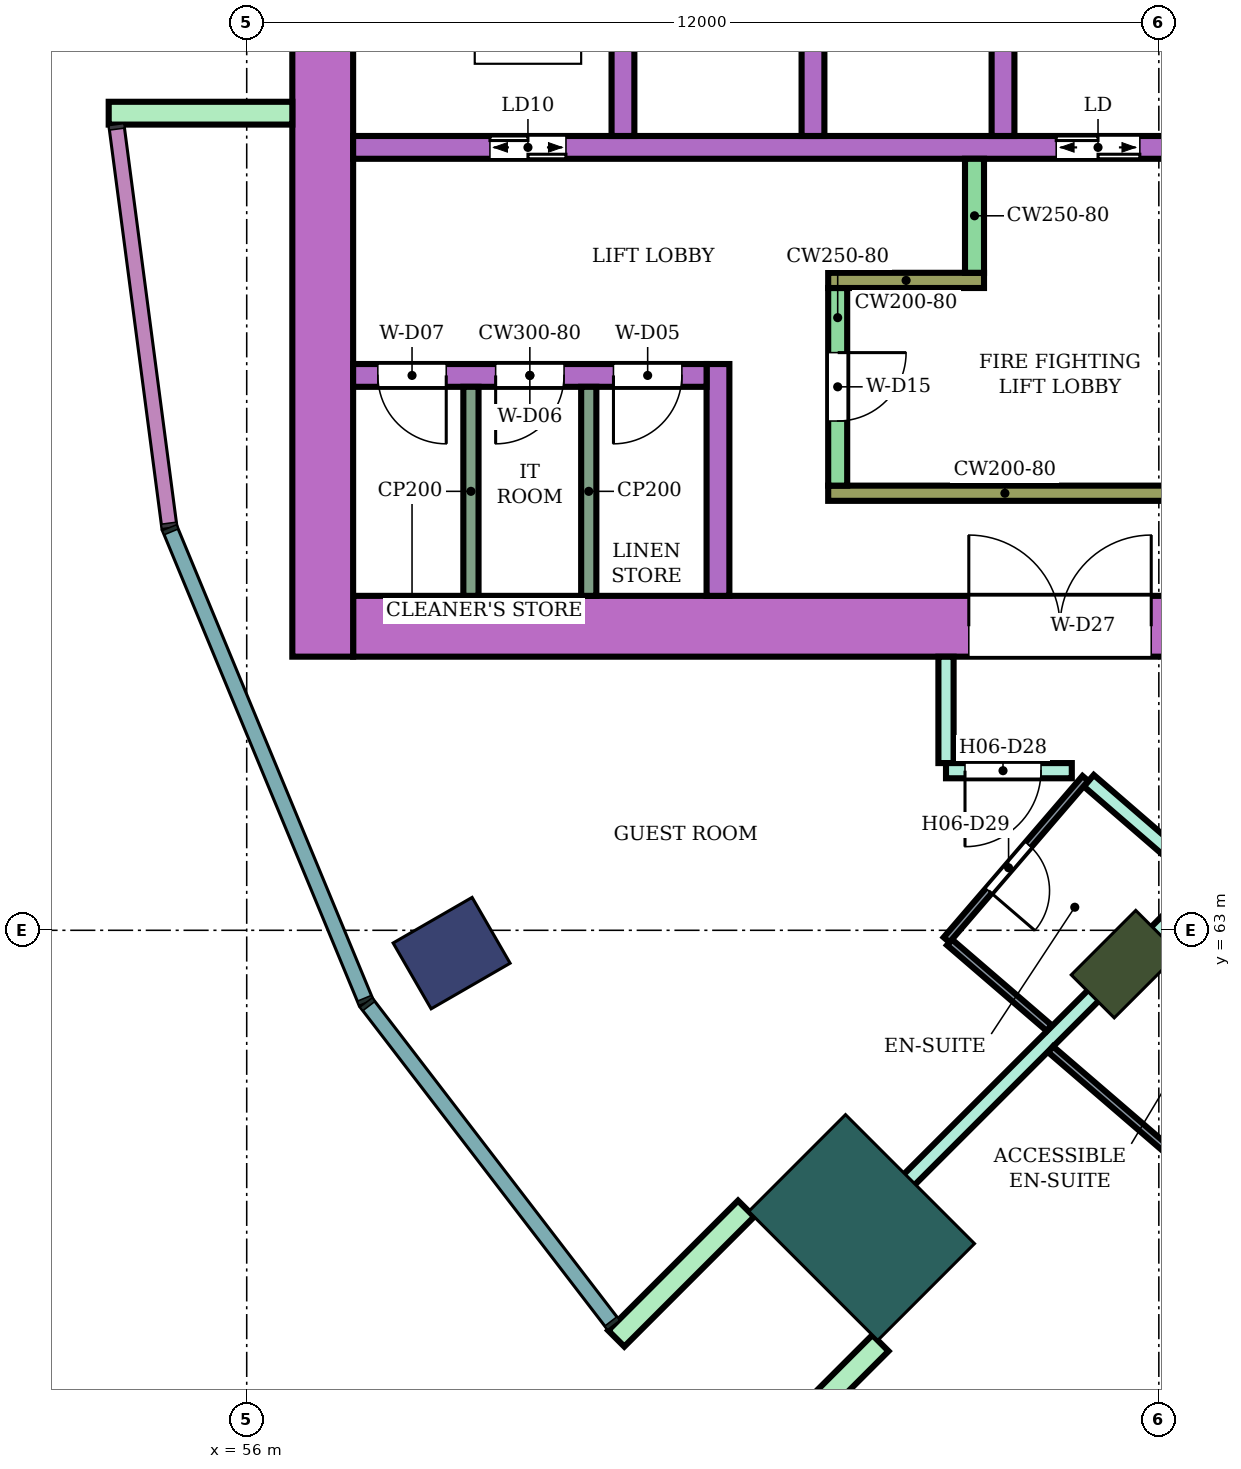
"""IFC4 building model, lengths in metres.
Left out: names, types, materials, properties, quantities, classifications, styles, units other than length and angle.
Written with IfcOpenShell. Run it as: python <this file> out.ifc"""

import sys

from ifc_helpers import new_model, si_unit, direction, frame, frame_2d, origin, origin_2d, place, context, subcontext, project, spatial, rectangle, extrude, element, fill, save


model = new_model("IFC4")
c1 = context("Model", 3, precision=1e-05, world=origin(), true_north=direction((0.0, 1.0)))
c2 = subcontext(c1, "Body", "Model", "MODEL_VIEW")
j1 = project(units=[si_unit("LENGTHUNIT", "METRE"), si_unit("PLANEANGLEUNIT", "RADIAN")], contexts=[c1])
p1 = place(None, origin())
s1 = spatial("IfcSite", under=j1, at=p1, CompositionType="ELEMENT")
p2 = place(p1, origin())
s2 = spatial("IfcBuilding", under=s1, at=p2, CompositionType="ELEMENT")
p3 = place(p2, frame((0.0, 0.0, 101.4)))
s3 = spatial("IfcBuildingStorey", under=s2, at=p3, CompositionType="ELEMENT", Elevation=101.4)
p4 = place(p3, frame((58.696, 62.7, 0.0), z_axis=(0.0, 0.0, 1.0), x_axis=(-0.866025403784, -0.5, 0.0)))
e1 = element("IfcColumn", 1, at=p4, inside=s3, PredefinedType="COLUMN", context=c2, shape_type="SweptSolid", body=[
    extrude(rectangle(XDim=1.2, YDim=1.0, at=origin_2d()), origin(), (0.0, 0.0, 1.0), 3.8),
])
p5 = place(p3, frame((67.555, 62.555, 0.0), z_axis=(0.0, 0.0, 1.0), x_axis=(-0.707106781187, -0.707106781187, 0.0)))
e2 = element("IfcColumn", 2, at=p5, inside=s3, PredefinedType="COLUMN", context=c2, shape_type="SweptSolid", body=[
    extrude(rectangle(XDim=1.2, YDim=0.8, at=origin_2d()), origin(), (0.0, 0.0, 1.0), 3.8),
])
p6 = place(p3, frame((64.09, 59.09, 0.0), z_axis=(0.0, 0.0, 1.0), x_axis=(-0.707106781187, -0.707106781187, 0.0)))
e3 = element("IfcColumn", 3, at=p6, inside=s3, PredefinedType="COLUMN", context=c2, shape_type="SweptSolid", body=[
    extrude(rectangle(XDim=1.8, YDim=2.4, at=origin_2d()), origin(), (0.0, 0.0, 1.0), 3.8),
])
p7 = place(p3, frame((72.1, 67.0, 0.0), z_axis=(0.0, 0.0, 1.0), x_axis=(-1.0, 0.0, 0.0)))
e4 = element("IfcWall", 4, at=p7, inside=s3, PredefinedType="SHEAR", context=c2, shape_type="SweptSolid", body=[
    extrude(rectangle(XDim=14.7, YDim=0.8, at=frame_2d((7.35, 0.0))), origin(), (0.0, 0.0, 1.0), 3.48),
])
p8 = place(p7, frame((4.2, 0.0, 0.0)))
e5 = element("IfcOpeningElement", 5, at=p8, cuts=e4, PredefinedType="OPENING", context=c2, shape_type="SweptSolid", body=[
    extrude(rectangle(XDim=2.4, YDim=2.4, at=frame_2d((1.2, 1.2))), frame((0.0, 0.41, 0.0), z_axis=(0.0, -1.0, 0.0), x_axis=(1.0, 0.0, 0.0)), (0.0, 0.0, 1.0), 0.82),
])
p9 = place(p3, frame((57.0, 83.4, 0.0), z_axis=(0.0, 0.0, 1.0), x_axis=(0.0, -1.0, 0.0)))
e6 = element("IfcWall", 6, at=p9, inside=s3, PredefinedType="SHEAR", context=c2, shape_type="SweptSolid", body=[
    extrude(rectangle(XDim=16.8, YDim=0.8, at=frame_2d((8.4, 0.0))), origin(), (0.0, 0.0, 1.0), 3.48),
])
p10 = place(p3, frame((68.3, 73.3, 0.0), z_axis=(0.0, 0.0, 1.0), x_axis=(-1.0, 0.0, 0.0)))
e7 = element("IfcWall", 7, at=p10, inside=s3, PredefinedType="SHEAR", context=c2, shape_type="SweptSolid", body=[
    extrude(rectangle(XDim=10.9, YDim=0.3, at=frame_2d((5.45, 0.0))), origin(), (0.0, 0.0, 1.0), 3.48),
])
p11 = place(p10, frame((0.55, 0.0, 0.0)))
e8 = element("IfcOpeningElement", 8, at=p11, cuts=e7, PredefinedType="OPENING", context=c2, shape_type="SweptSolid", body=[
    extrude(rectangle(XDim=1.1, YDim=2.1, at=frame_2d((0.55, 1.05))), frame((0.0, 0.16, 0.0), z_axis=(0.0, -1.0, 0.0), x_axis=(1.0, 0.0, 0.0)), (0.0, 0.0, 1.0), 0.32),
])
p12 = place(p10, frame((8.1, 0.0, 0.0)))
e9 = element("IfcOpeningElement", 9, at=p12, cuts=e7, PredefinedType="OPENING", context=c2, shape_type="SweptSolid", body=[
    extrude(rectangle(XDim=1.0, YDim=2.1, at=frame_2d((0.5, 1.05))), frame((0.0, 0.16, 0.0), z_axis=(0.0, -1.0, 0.0), x_axis=(1.0, 0.0, 0.0)), (0.0, 0.0, 1.0), 0.32),
])
for number, where, z_axis, x_axis in (
    (10, (65.95, 76.0, 0.0), (0.0, 0.0, 1.0), (0.0, -1.0, 0.0)),
    (11, (63.45, 76.0, 0.0), (0.0, 0.0, 1.0), (0.0, -1.0, 0.0)),
    (12, (60.95, 76.0, 0.0), (0.0, 0.0, 1.0), (0.0, -1.0, 0.0)),
):
    element("IfcWall", number, at=place(p3, frame(where, z_axis=z_axis, x_axis=x_axis)), inside=s3, PredefinedType="SHEAR", context=c2, shape_type="SweptSolid", body=[
        extrude(rectangle(XDim=2.55, YDim=0.3, at=frame_2d((1.275, 0.0))), origin(), (0.0, 0.0, 1.0), 3.48),
    ])
p13 = place(p3, frame((68.3, 68.75, 0.0), z_axis=(0.0, 0.0, 1.0), x_axis=(-1.0, 0.0, 0.0)))
e13 = element("IfcWall", 13, at=p13, inside=s3, PredefinedType="SHEAR", context=c2, shape_type="SweptSolid", body=[
    extrude(rectangle(XDim=4.65, YDim=0.2, at=frame_2d((2.325, 0.0))), origin(), (0.0, 0.0, 1.0), 3.48),
])
p14 = place(p3, frame((63.775, 71.45, 0.0), z_axis=(0.0, 0.0, 1.0), x_axis=(0.0, -1.0, 0.0)))
e14 = element("IfcWall", 14, at=p14, inside=s3, PredefinedType="SHEAR", context=c2, shape_type="SweptSolid", body=[
    extrude(rectangle(XDim=2.6, YDim=0.25, at=frame_2d((1.3, 0.0))), origin(), (0.0, 0.0, 1.0), 3.48),
])
p15 = place(p14, frame((0.85, 0.0, 0.0)))
e15 = element("IfcOpeningElement", 15, at=p15, cuts=e14, PredefinedType="OPENING", context=c2, shape_type="SweptSolid", body=[
    extrude(rectangle(XDim=0.9, YDim=2.1, at=frame_2d((0.45, 1.05))), frame((0.0, 0.135, 0.0), z_axis=(0.0, -1.0, 0.0), x_axis=(1.0, 0.0, 0.0)), (0.0, 0.0, 1.0), 0.27),
])
p16 = place(p3, frame((65.7, 71.55, 0.0), z_axis=(0.0, 0.0, 1.0), x_axis=(-1.0, 0.0, 0.0)))
e16 = element("IfcWall", 16, at=p16, inside=s3, PredefinedType="SHEAR", context=c2, shape_type="SweptSolid", body=[
    extrude(rectangle(XDim=2.05, YDim=0.2, at=frame_2d((1.025, 0.0))), origin(), (0.0, 0.0, 1.0), 3.48),
])
p17 = place(p3, frame((65.575, 73.15, 0.0), z_axis=(0.0, 0.0, 1.0), x_axis=(0.0, -1.0, 0.0)))
e17 = element("IfcWall", 17, at=p17, inside=s3, PredefinedType="SHEAR", context=c2, shape_type="SweptSolid", body=[
    extrude(rectangle(XDim=1.5, YDim=0.25, at=frame_2d((0.75, 0.0))), origin(), (0.0, 0.0, 1.0), 3.48),
])
p18 = place(p3, frame((62.2, 70.45, 0.0), z_axis=(0.0, 0.0, 1.0), x_axis=(0.0, -1.0, 0.0)))
e18 = element("IfcWall", 18, at=p18, inside=s3, PredefinedType="SHEAR", context=c2, shape_type="SweptSolid", body=[
    extrude(rectangle(XDim=3.05, YDim=0.3, at=frame_2d((1.525, 0.0))), origin(), (0.0, 0.0, 1.0), 3.48),
])
p19 = place(p3, frame((62.05, 70.3, 0.0), z_axis=(0.0, 0.0, 1.0), x_axis=(-1.0, 0.0, 0.0)))
e19 = element("IfcWall", 19, at=p19, inside=s3, PredefinedType="SHEAR", context=c2, shape_type="SweptSolid", body=[
    extrude(rectangle(XDim=4.65, YDim=0.3, at=frame_2d((2.325, 0.0))), origin(), (0.0, 0.0, 1.0), 3.48),
])
p20 = place(p19, frame((0.325, 0.0, 0.0)))
e20 = element("IfcOpeningElement", 20, at=p20, cuts=e19, PredefinedType="OPENING", context=c2, shape_type="SweptSolid", body=[
    extrude(rectangle(XDim=0.9, YDim=2.1, at=frame_2d((0.45, 1.05))), frame((0.0, 0.16, 0.0), z_axis=(0.0, -1.0, 0.0), x_axis=(1.0, 0.0, 0.0)), (0.0, 0.0, 1.0), 0.32),
])
p21 = place(p19, frame((1.875, 0.0, 0.0)))
e21 = element("IfcOpeningElement", 21, at=p21, cuts=e19, PredefinedType="OPENING", context=c2, shape_type="SweptSolid", body=[
    extrude(rectangle(XDim=0.9, YDim=2.1, at=frame_2d((0.45, 1.05))), frame((0.0, 0.16, 0.0), z_axis=(0.0, -1.0, 0.0), x_axis=(1.0, 0.0, 0.0)), (0.0, 0.0, 1.0), 0.32),
])
p22 = place(p19, frame((3.425, 0.0, 0.0)))
e22 = element("IfcOpeningElement", 22, at=p22, cuts=e19, PredefinedType="OPENING", context=c2, shape_type="SweptSolid", body=[
    extrude(rectangle(XDim=0.9, YDim=2.1, at=frame_2d((0.45, 1.05))), frame((0.0, 0.16, 0.0), z_axis=(0.0, -1.0, 0.0), x_axis=(1.0, 0.0, 0.0)), (0.0, 0.0, 1.0), 0.32),
])
for number, where, z_axis, x_axis in (
    (23, (56.6, 73.75, 0.0), (0.0, 0.0, 1.0), (-1.0, 0.0, 0.0)),
    (24, (62.57, 59.338, 0.0), (0.0, 0.0, 1.0), (-0.707, -0.707, 0.0)),
    (25, (64.338, 57.57, 0.0), (0.0, 0.0, 1.0), (-0.707, -0.707, 0.0)),
):
    element("IfcWall", number, at=place(p3, frame(where, z_axis=z_axis, x_axis=x_axis)), inside=s3, PredefinedType="NOTDEFINED", context=c2, shape_type="SweptSolid", body=[
        extrude(rectangle(XDim=2.416, YDim=0.3, at=frame_2d((1.208, 0.0))), origin(), (0.0, 0.0, 1.0), 3.8),
    ])
p23 = place(p3, frame((63.594, 58.598, 0.0), z_axis=(0.0, 0.0, 1.0), x_axis=(0.707228748718, 0.706984792613, 0.0)))
e26 = element("IfcWall", 26, at=p23, inside=s3, PredefinedType="PARTITIONING", context=c2, shape_type="SweptSolid", body=[
    extrude(rectangle(XDim=7.005, YDim=0.2, at=frame_2d((3.503, 0.0))), origin(), (0.0, 0.0, 1.0), 3.35),
])
p24 = place(p3, frame((65.2, 65.2, 0.0), z_axis=(0.0, 0.0, 1.0), x_axis=(0.0, 1.0, 0.0)))
e27 = element("IfcWall", 27, at=p24, inside=s3, PredefinedType="PARTITIONING", context=c2, shape_type="SweptSolid", body=[
    extrude(rectangle(XDim=1.399, YDim=0.2, at=frame_2d((0.7, 0.0))), origin(), (0.0, 0.0, 1.0), 3.35),
])
p25 = place(p3, frame((65.2, 65.1, 0.0), z_axis=(0.0, 0.0, 1.0), x_axis=(1.0, 0.0, 0.0)))
e28 = element("IfcWall", 28, at=p25, inside=s3, PredefinedType="PARTITIONING", context=c2, shape_type="SweptSolid", body=[
    extrude(rectangle(XDim=1.655, YDim=0.2, at=frame_2d((0.828, 0.0))), origin(), (0.0, 0.0, 1.0), 3.35),
])
p26 = place(p25, frame((0.25, 0.0, 0.0)))
e29 = element("IfcOpeningElement", 29, at=p26, cuts=e28, PredefinedType="OPENING", context=c2, shape_type="SweptSolid", body=[
    extrude(rectangle(XDim=1.0, YDim=2.1, at=frame_2d((0.5, 1.05))), frame((0.0, 0.11, 0.0), z_axis=(0.0, -1.0, 0.0), x_axis=(1.0, 0.0, 0.0)), (0.0, 0.0, 1.0), 0.22),
])
p27 = place(p3, frame((67.079, 64.968, 0.0), z_axis=(0.0, 0.0, 1.0), x_axis=(0.756371089567, -0.654142778656, 0.0)))
e30 = element("IfcWall", 30, at=p27, inside=s3, PredefinedType="PARTITIONING", context=c2, shape_type="SweptSolid", body=[
    extrude(rectangle(XDim=6.185, YDim=0.2, at=frame_2d((3.093, 0.0))), origin(), (0.0, 0.0, 1.0), 3.35),
])
p28 = place(p27, frame((4.778, 0.0, 0.0)))
e31 = element("IfcOpeningElement", 31, at=p28, cuts=e30, PredefinedType="OPENING", context=c2, shape_type="SweptSolid", body=[
    extrude(rectangle(XDim=1.1, YDim=2.1, at=frame_2d((0.55, 1.05))), frame((0.0, 0.11, 0.0), z_axis=(0.0, -1.0, 0.0), x_axis=(1.0, 0.0, 0.0)), (0.0, 0.0, 1.0), 0.22),
])
p29 = place(p3, frame((67.096, 52.662, 0.0), z_axis=(0.0, 0.0, 1.0), x_axis=(0.500222922337, 0.865896661253, 0.0)))
e32 = element("IfcWall", 32, at=p29, inside=s3, PredefinedType="PARTITIONING", context=c2, shape_type="SweptSolid", body=[
    extrude(rectangle(XDim=9.374, YDim=0.2, at=frame_2d((4.687, 0.0))), origin(), (0.0, 0.0, 1.0), 3.35),
])
p30 = place(p3, frame((65.246, 62.842, 0.0), z_axis=(0.0, 0.0, 1.0), x_axis=(0.758030338995, -0.652219292234, 0.0)))
e33 = element("IfcWall", 33, at=p30, inside=s3, PredefinedType="PARTITIONING", context=c2, shape_type="SweptSolid", body=[
    extrude(rectangle(XDim=1.73, YDim=0.1, at=frame_2d((0.865, 0.0))), origin(), (0.0, 0.0, 1.0), 3.35),
])
p31 = place(p3, frame((65.208, 62.875, 0.0), z_axis=(0.0, 0.0, 1.0), x_axis=(0.65205430601, 0.758172264076, 0.0)))
e34 = element("IfcWall", 34, at=p31, inside=s3, PredefinedType="PARTITIONING", context=c2, shape_type="SweptSolid", body=[
    extrude(rectangle(XDim=2.8, YDim=0.1, at=frame_2d((1.4, 0.0))), origin(), (0.0, 0.0, 1.0), 3.35),
])
p32 = place(p31, frame((0.85, 0.0, 0.0)))
e35 = element("IfcOpeningElement", 35, at=p32, cuts=e34, PredefinedType="OPENING", context=c2, shape_type="SweptSolid", body=[
    extrude(rectangle(XDim=0.8, YDim=2.1, at=frame_2d((0.4, 1.05))), frame((0.0, 0.06, 0.0), z_axis=(0.0, -1.0, 0.0), x_axis=(1.0, 0.0, 0.0)), (0.0, 0.0, 1.0), 0.12),
])
p33 = place(p3, frame((66.576, 61.435, 0.0), z_axis=(0.0, 0.0, 1.0), x_axis=(0.757970550281, -0.652288774169, 0.0)))
e36 = element("IfcWall", 36, at=p33, inside=s3, PredefinedType="PARTITIONING", context=c2, shape_type="SweptSolid", body=[
    extrude(rectangle(XDim=2.576, YDim=0.1, at=frame_2d((1.288, 0.0))), origin(), (0.0, 0.0, 1.0), 3.35),
])
for number, where, z_axis, x_axis in (
    (37, (60.5, 70.15, 0.0), (0.0, 0.0, 1.0), (0.0, -1.0, 0.0)),
    (38, (58.95, 70.15, 0.0), (0.0, 0.0, 1.0), (0.0, -1.0, 0.0)),
):
    element("IfcWall", number, at=place(p3, frame(where, z_axis=z_axis, x_axis=x_axis)), inside=s3, PredefinedType="PARTITIONING", context=c2, shape_type="SweptSolid", body=[
        extrude(rectangle(XDim=2.75, YDim=0.2, at=frame_2d((1.375, 0.0))), origin(), (0.0, 0.0, 1.0), 3.48),
    ])
p34 = place(p26, frame((1.0, 0.0, 0.0), z_axis=(0.0, 0.0, 1.0), x_axis=(-1.0, 0.0, 0.0)))
e39 = element("IfcDoor", 39, at=p34, inside=s3, OperationType="SINGLE_SWING_RIGHT", PredefinedType="DOOR", context=c2, shape_type="SweptSolid", body=[
    extrude(rectangle(XDim=1.0, YDim=2.1, at=frame_2d((0.5, 1.05))), frame((0.0, 0.025, 0.0), z_axis=(0.0, -1.0, 0.0), x_axis=(1.0, 0.0, 0.0)), (0.0, 0.0, 1.0), 0.05),
])
fill(e29, e39)
p35 = place(p32, frame((0.8, 0.0, 0.0), z_axis=(0.0, 0.0, 1.0), x_axis=(-1.0, 0.0, 0.0)))
e40 = element("IfcDoor", 40, at=p35, inside=s3, OperationType="SINGLE_SWING_RIGHT", PredefinedType="DOOR", context=c2, shape_type="SweptSolid", body=[
    extrude(rectangle(XDim=0.8, YDim=2.1, at=frame_2d((0.4, 1.05))), frame((0.0, 0.025, 0.0), z_axis=(0.0, -1.0, 0.0), x_axis=(1.0, 0.0, 0.0)), (0.0, 0.0, 1.0), 0.05),
])
fill(e35, e40)
p36 = place(p11, origin())
e41 = element("IfcDoor", 41, at=p36, inside=s3, OperationType="DOUBLE_DOOR_SLIDING", PredefinedType="DOOR", context=c2, shape_type="SweptSolid", body=[
    extrude(rectangle(XDim=1.1, YDim=2.1, at=frame_2d((0.55, 1.05))), frame((0.0, 0.025, 0.0), z_axis=(0.0, -1.0, 0.0), x_axis=(1.0, 0.0, 0.0)), (0.0, 0.0, 1.0), 0.05),
])
fill(e8, e41)
p37 = place(p12, origin())
e42 = element("IfcDoor", 42, at=p37, inside=s3, OperationType="DOUBLE_DOOR_SLIDING", PredefinedType="DOOR", context=c2, shape_type="SweptSolid", body=[
    extrude(rectangle(XDim=1.0, YDim=2.1, at=frame_2d((0.5, 1.05))), frame((0.0, 0.025, 0.0), z_axis=(0.0, -1.0, 0.0), x_axis=(1.0, 0.0, 0.0)), (0.0, 0.0, 1.0), 0.05),
])
fill(e9, e42)
p38 = place(p15, origin())
e43 = element("IfcDoor", 43, at=p38, inside=s3, OperationType="SINGLE_SWING_LEFT", PredefinedType="DOOR", context=c2, shape_type="SweptSolid", body=[
    extrude(rectangle(XDim=0.9, YDim=2.1, at=frame_2d((0.45, 1.05))), frame((0.0, 0.025, 0.0), z_axis=(0.0, -1.0, 0.0), x_axis=(1.0, 0.0, 0.0)), (0.0, 0.0, 1.0), 0.05),
])
fill(e15, e43)
p39 = place(p20, origin())
e44 = element("IfcDoor", 44, at=p39, inside=s3, OperationType="SINGLE_SWING_RIGHT", PredefinedType="DOOR", context=c2, shape_type="SweptSolid", body=[
    extrude(rectangle(XDim=0.9, YDim=2.1, at=frame_2d((0.45, 1.05))), frame((0.0, 0.025, 0.0), z_axis=(0.0, -1.0, 0.0), x_axis=(1.0, 0.0, 0.0)), (0.0, 0.0, 1.0), 0.05),
])
fill(e20, e44)
p40 = place(p21, origin())
e45 = element("IfcDoor", 45, at=p40, inside=s3, OperationType="SINGLE_SWING_RIGHT", PredefinedType="DOOR", context=c2, shape_type="SweptSolid", body=[
    extrude(rectangle(XDim=0.9, YDim=2.1, at=frame_2d((0.45, 1.05))), frame((0.0, 0.025, 0.0), z_axis=(0.0, -1.0, 0.0), x_axis=(1.0, 0.0, 0.0)), (0.0, 0.0, 1.0), 0.05),
])
fill(e21, e45)
p41 = place(p22, origin())
e46 = element("IfcDoor", 46, at=p41, inside=s3, OperationType="SINGLE_SWING_LEFT", PredefinedType="DOOR", context=c2, shape_type="SweptSolid", body=[
    extrude(rectangle(XDim=0.9, YDim=2.1, at=frame_2d((0.45, 1.05))), frame((0.0, 0.025, 0.0), z_axis=(0.0, -1.0, 0.0), x_axis=(1.0, 0.0, 0.0)), (0.0, 0.0, 1.0), 0.05),
])
fill(e22, e46)
p42 = place(p8, frame((2.4, 0.0, 0.0), z_axis=(0.0, 0.0, 1.0), x_axis=(-1.0, 0.0, 0.0)))
e47 = element("IfcDoor", 47, at=p42, inside=s3, OperationType="DOUBLE_DOOR_SINGLE_SWING", PredefinedType="DOOR", context=c2, shape_type="SweptSolid", body=[
    extrude(rectangle(XDim=2.4, YDim=2.4, at=frame_2d((1.2, 1.2))), frame((0.0, 0.025, 0.0), z_axis=(0.0, -1.0, 0.0), x_axis=(1.0, 0.0, 0.0)), (0.0, 0.0, 1.0), 0.05),
])
fill(e5, e47)
save(model, sys.argv[1])
